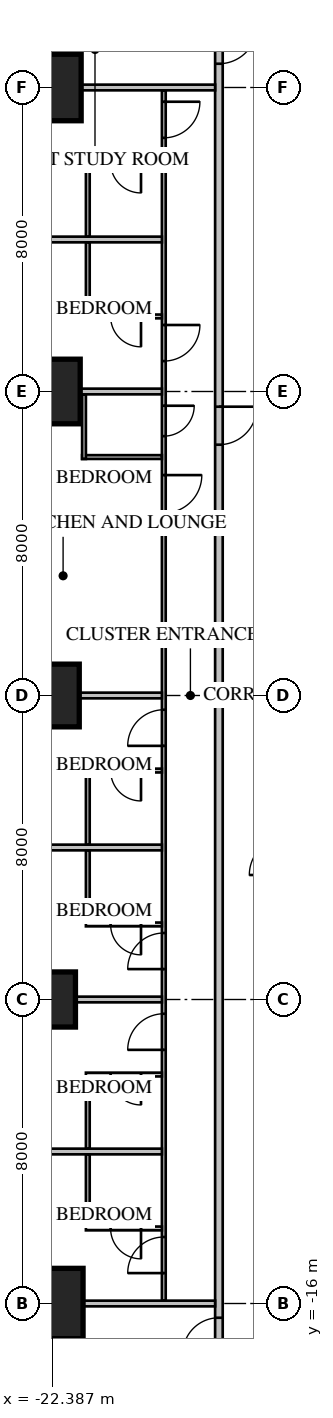
"""IFC4 building model, lengths in metres.
Left out: names, types, materials, properties, quantities, classifications, styles, units other than length and angle.
Written with IfcOpenShell. Run it as: python <this file> out.ifc"""

import sys

from ifc_helpers import new_model, si_unit, direction, frame, frame_2d, origin, origin_2d, place, context, subcontext, project, spatial, rectangle, extrude, element, fill, save


model = new_model("IFC4")
c1 = context("Model", 3, precision=1e-05, world=origin(), true_north=direction((0.0, 1.0)))
c2 = subcontext(c1, "Body", "Model", "MODEL_VIEW")
j1 = project(units=[si_unit("LENGTHUNIT", "METRE"), si_unit("PLANEANGLEUNIT", "RADIAN")], contexts=[c1])
p1 = place(None, origin())
s1 = spatial("IfcSite", under=j1, at=p1, CompositionType="ELEMENT")
p2 = place(p1, origin())
s2 = spatial("IfcBuilding", under=s1, at=p2, CompositionType="ELEMENT")
p3 = place(p2, frame((0.0, 0.0, 39.1)))
s3 = spatial("IfcBuildingStorey", under=s2, at=p3, CompositionType="ELEMENT", Elevation=39.1)
p4 = place(p3, frame((-22.5, 16.0, 0.0), z_axis=(0.0, 0.0, 1.0), x_axis=(1.0, 0.0, 0.0)))
e1 = element("IfcColumn", 1, at=p4, inside=s3, PredefinedType="COLUMN", context=c2, shape_type="SweptSolid", body=[
    extrude(rectangle(XDim=1.75, YDim=1.75, at=origin_2d()), origin(), (0.0, 0.0, 1.0), 3.85),
])
p5 = place(p3, frame((-22.5, 8.0, 0.0), z_axis=(0.0, 0.0, 1.0), x_axis=(1.0, 0.0, 0.0)))
e2 = element("IfcColumn", 2, at=p5, inside=s3, PredefinedType="COLUMN", context=c2, shape_type="SweptSolid", body=[
    extrude(rectangle(XDim=1.7, YDim=1.7, at=origin_2d()), origin(), (0.0, 0.0, 1.0), 3.85),
])
p6 = place(p3, frame((-22.5, 0.0, 0.0), z_axis=(0.0, 0.0, 1.0), x_axis=(1.0, 0.0, 0.0)))
e3 = element("IfcColumn", 3, at=p6, inside=s3, PredefinedType="COLUMN", context=c2, shape_type="SweptSolid", body=[
    extrude(rectangle(XDim=1.65, YDim=1.65, at=origin_2d()), origin(), (0.0, 0.0, 1.0), 3.85),
])
p7 = place(p3, frame((-22.5, -8.0, 0.0), z_axis=(0.0, 0.0, 1.0), x_axis=(1.0, 0.0, 0.0)))
e4 = element("IfcColumn", 4, at=p7, inside=s3, PredefinedType="COLUMN", context=c2, shape_type="SweptSolid", body=[
    extrude(rectangle(XDim=1.45, YDim=1.45, at=origin_2d()), origin(), (0.0, 0.0, 1.0), 3.85),
])
p8 = place(p3, frame((-22.5, -16.0, 0.0), z_axis=(0.0, 0.0, 1.0), x_axis=(1.0, 0.0, 0.0)))
e5 = element("IfcColumn", 5, at=p8, inside=s3, PredefinedType="COLUMN", context=c2, shape_type="SweptSolid", body=[
    extrude(rectangle(XDim=1.85, YDim=1.85, at=origin_2d()), origin(), (0.0, 0.0, 1.0), 3.85),
])
p9 = place(p3, frame((-18.0, 18.0, 0.0), z_axis=(0.0, 0.0, 1.0), x_axis=(0.0, -1.0, 0.0)))
e6 = element("IfcWall", 6, at=p9, inside=s3, PredefinedType="PARTITIONING", context=c2, shape_type="SweptSolid", body=[
    extrude(rectangle(XDim=36.0, YDim=0.2, at=frame_2d((18.0, 0.0))), origin(), (0.0, 0.0, 1.0), 3.65),
])
p10 = place(p9, frame((10.4, 0.0, 0.0)))
e7 = element("IfcOpeningElement", 7, at=p10, cuts=e6, PredefinedType="OPENING", context=c2, shape_type="SweptSolid", body=[
    extrude(rectangle(XDim=1.0, YDim=2.1, at=frame_2d((0.5, 1.05))), frame((0.0, 0.12, 0.0), z_axis=(0.0, -1.0, 0.0), x_axis=(1.0, 0.0, 0.0)), (0.0, 0.0, 1.0), 0.24),
])
p11 = place(p9, frame((0.375, 0.0, 0.0)))
e8 = element("IfcOpeningElement", 8, at=p11, cuts=e6, PredefinedType="OPENING", context=c2, shape_type="SweptSolid", body=[
    extrude(rectangle(XDim=1.0, YDim=2.1, at=frame_2d((0.5, 1.05))), frame((0.0, 0.12, 0.0), z_axis=(0.0, -1.0, 0.0), x_axis=(1.0, 0.0, 0.0)), (0.0, 0.0, 1.0), 0.24),
])
p12 = place(p9, frame((34.375, 0.0, 0.0)))
e9 = element("IfcOpeningElement", 9, at=p12, cuts=e6, PredefinedType="OPENING", context=c2, shape_type="SweptSolid", body=[
    extrude(rectangle(XDim=0.95, YDim=2.1, at=frame_2d((0.475, 1.05))), frame((0.0, 0.12, 0.0), z_axis=(0.0, -1.0, 0.0), x_axis=(1.0, 0.0, 0.0)), (0.0, 0.0, 1.0), 0.24),
])
p13 = place(p3, frame((-19.45, 15.925, 0.0), z_axis=(0.0, 0.0, 1.0), x_axis=(0.0, -1.0, 0.0)))
e10 = element("IfcWall", 10, at=p13, inside=s3, PredefinedType="PARTITIONING", context=c2, shape_type="SweptSolid", body=[
    extrude(rectangle(XDim=31.85, YDim=0.1, at=frame_2d((15.925, 0.0))), origin(), (0.0, 0.0, 1.0), 3.65),
])
p14 = place(p13, frame((10.125, 0.0, 0.0)))
e11 = element("IfcOpeningElement", 11, at=p14, cuts=e10, PredefinedType="OPENING", context=c2, shape_type="SweptSolid", body=[
    extrude(rectangle(XDim=1.0, YDim=2.1, at=frame_2d((0.5, 1.05))), frame((0.0, 0.07, 0.0), z_axis=(0.0, -1.0, 0.0), x_axis=(1.0, 0.0, 0.0)), (0.0, 0.0, 1.0), 0.14),
])
p15 = place(p13, frame((8.3, 0.0, 0.0)))
e12 = element("IfcOpeningElement", 12, at=p15, cuts=e10, PredefinedType="OPENING", context=c2, shape_type="SweptSolid", body=[
    extrude(rectangle(XDim=0.8, YDim=2.1, at=frame_2d((0.4, 1.05))), frame((0.0, 0.07, 0.0), z_axis=(0.0, -1.0, 0.0), x_axis=(1.0, 0.0, 0.0)), (0.0, 0.0, 1.0), 0.14),
])
p16 = place(p13, frame((0.3, 0.0, 0.0)))
e13 = element("IfcOpeningElement", 13, at=p16, cuts=e10, PredefinedType="OPENING", context=c2, shape_type="SweptSolid", body=[
    extrude(rectangle(XDim=0.95, YDim=2.1, at=frame_2d((0.475, 1.05))), frame((0.0, 0.07, 0.0), z_axis=(0.0, -1.0, 0.0), x_axis=(1.0, 0.0, 0.0)), (0.0, 0.0, 1.0), 0.14),
])
p17 = place(p13, frame((6.175, 0.0, 0.0)))
e14 = element("IfcOpeningElement", 14, at=p17, cuts=e10, PredefinedType="OPENING", context=c2, shape_type="SweptSolid", body=[
    extrude(rectangle(XDim=0.95, YDim=2.1, at=frame_2d((0.475, 1.05))), frame((0.0, 0.07, 0.0), z_axis=(0.0, -1.0, 0.0), x_axis=(1.0, 0.0, 0.0)), (0.0, 0.0, 1.0), 0.14),
])
p18 = place(p13, frame((16.3, 0.0, 0.0)))
e15 = element("IfcOpeningElement", 15, at=p18, cuts=e10, PredefinedType="OPENING", context=c2, shape_type="SweptSolid", body=[
    extrude(rectangle(XDim=0.95, YDim=2.1, at=frame_2d((0.475, 1.05))), frame((0.0, 0.07, 0.0), z_axis=(0.0, -1.0, 0.0), x_axis=(1.0, 0.0, 0.0)), (0.0, 0.0, 1.0), 0.14),
])
p19 = place(p13, frame((22.175, 0.0, 0.0)))
e16 = element("IfcOpeningElement", 16, at=p19, cuts=e10, PredefinedType="OPENING", context=c2, shape_type="SweptSolid", body=[
    extrude(rectangle(XDim=0.95, YDim=2.1, at=frame_2d((0.475, 1.05))), frame((0.0, 0.07, 0.0), z_axis=(0.0, -1.0, 0.0), x_axis=(1.0, 0.0, 0.0)), (0.0, 0.0, 1.0), 0.14),
])
p20 = place(p13, frame((24.3, 0.0, 0.0)))
e17 = element("IfcOpeningElement", 17, at=p20, cuts=e10, PredefinedType="OPENING", context=c2, shape_type="SweptSolid", body=[
    extrude(rectangle(XDim=0.95, YDim=2.1, at=frame_2d((0.475, 1.05))), frame((0.0, 0.07, 0.0), z_axis=(0.0, -1.0, 0.0), x_axis=(1.0, 0.0, 0.0)), (0.0, 0.0, 1.0), 0.14),
])
p21 = place(p13, frame((30.175, 0.0, 0.0)))
e18 = element("IfcOpeningElement", 18, at=p21, cuts=e10, PredefinedType="OPENING", context=c2, shape_type="SweptSolid", body=[
    extrude(rectangle(XDim=0.95, YDim=2.1, at=frame_2d((0.475, 1.05))), frame((0.0, 0.07, 0.0), z_axis=(0.0, -1.0, 0.0), x_axis=(1.0, 0.0, 0.0)), (0.0, 0.0, 1.0), 0.14),
])
p22 = place(p3, frame((-19.5, 6.275, 0.0), z_axis=(0.0, 0.0, 1.0), x_axis=(-1.0, 0.0, 0.0)))
e19 = element("IfcWall", 19, at=p22, inside=s3, PredefinedType="PARTITIONING", context=c2, shape_type="SweptSolid", body=[
    extrude(rectangle(XDim=2.1, YDim=0.1, at=frame_2d((1.05, 0.0))), origin(), (0.0, 0.0, 1.0), 3.65),
])
p23 = place(p3, frame((-21.55, 7.925, 0.0), z_axis=(0.0, 0.0, 1.0), x_axis=(0.0, -1.0, 0.0)))
e20 = element("IfcWall", 20, at=p23, inside=s3, PredefinedType="PARTITIONING", context=c2, shape_type="SweptSolid", body=[
    extrude(rectangle(XDim=1.7, YDim=0.1, at=frame_2d((0.85, 0.0))), origin(), (0.0, 0.0, 1.0), 3.65),
])
p24 = place(p3, frame((-18.1, 16.0, 0.0), z_axis=(0.0, 0.0, 1.0), x_axis=(-1.0, 0.0, 0.0)))
e21 = element("IfcWall", 21, at=p24, inside=s3, PredefinedType="PARTITIONING", context=c2, shape_type="SweptSolid", body=[
    extrude(rectangle(XDim=6.589, YDim=0.15, at=frame_2d((3.295, 0.0))), origin(), (0.0, 0.0, 1.0), 3.65),
])
for number, where, z_axis, x_axis in (
    (22, (-19.5, 12.0, 0.0), (0.0, 0.0, 1.0), (-1.0, 0.0, 0.0)),
    (23, (-19.5, 8.0, 0.0), (0.0, 0.0, 1.0), (-1.0, 0.0, 0.0)),
):
    element("IfcWall", number, at=place(p3, frame(where, z_axis=z_axis, x_axis=x_axis)), inside=s3, PredefinedType="PARTITIONING", context=c2, shape_type="SweptSolid", body=[
        extrude(rectangle(XDim=5.2, YDim=0.15, at=frame_2d((2.6, 0.0))), origin(), (0.0, 0.0, 1.0), 3.65),
    ])
p25 = place(p3, frame((-19.5, 0.0, 0.0), z_axis=(0.0, 0.0, 1.0), x_axis=(-1.0, 0.0, 0.0)))
e24 = element("IfcWall", 24, at=p25, inside=s3, PredefinedType="PARTITIONING", context=c2, shape_type="SweptSolid", body=[
    extrude(rectangle(XDim=5.2, YDim=0.15, at=frame_2d((2.6, 0.0))), origin(), (0.0, 0.0, 1.0), 2.957),
])
for number, where, z_axis, x_axis in (
    (25, (-19.5, -4.0, 0.0), (0.0, 0.0, 1.0), (-1.0, 0.0, 0.0)),
    (26, (-19.5, -8.0, 0.0), (0.0, 0.0, 1.0), (-1.0, 0.0, 0.0)),
    (27, (-19.5, -12.0, 0.0), (0.0, 0.0, 1.0), (-1.0, 0.0, 0.0)),
):
    element("IfcWall", number, at=place(p3, frame(where, z_axis=z_axis, x_axis=x_axis)), inside=s3, PredefinedType="PARTITIONING", context=c2, shape_type="SweptSolid", body=[
        extrude(rectangle(XDim=5.2, YDim=0.15, at=frame_2d((2.6, 0.0))), origin(), (0.0, 0.0, 1.0), 3.65),
    ])
p26 = place(p3, frame((-18.1, -16.0, 0.0), z_axis=(0.0, 0.0, 1.0), x_axis=(-1.0, 0.0, 0.0)))
e28 = element("IfcWall", 28, at=p26, inside=s3, PredefinedType="PARTITIONING", context=c2, shape_type="SweptSolid", body=[
    extrude(rectangle(XDim=6.589, YDim=0.15, at=frame_2d((3.295, 0.0))), origin(), (0.0, 0.0, 1.0), 3.65),
])
p27 = place(p3, frame((-19.5, 14.025, 0.0), z_axis=(0.0, 0.0, 1.0), x_axis=(-1.0, 0.0, 0.0)))
e29 = element("IfcWall", 29, at=p27, inside=s3, PredefinedType="PARTITIONING", context=c2, shape_type="SweptSolid", body=[
    extrude(rectangle(XDim=2.0, YDim=0.1, at=frame_2d((1.0, 0.0))), origin(), (0.0, 0.0, 1.0), 3.65),
])
p28 = place(p27, frame((0.55, 0.0, 0.0)))
e30 = element("IfcOpeningElement", 30, at=p28, cuts=e29, PredefinedType="OPENING", context=c2, shape_type="SweptSolid", body=[
    extrude(rectangle(XDim=0.8, YDim=2.1, at=frame_2d((0.4, 1.05))), frame((0.0, 0.07, 0.0), z_axis=(0.0, -1.0, 0.0), x_axis=(1.0, 0.0, 0.0)), (0.0, 0.0, 1.0), 0.14),
])
p29 = place(p3, frame((-21.45, 13.975, 0.0), z_axis=(0.0, 0.0, 1.0), x_axis=(0.0, -1.0, 0.0)))
e31 = element("IfcWall", 31, at=p29, inside=s3, PredefinedType="PARTITIONING", context=c2, shape_type="SweptSolid", body=[
    extrude(rectangle(XDim=1.9, YDim=0.1, at=frame_2d((0.95, 0.0))), origin(), (0.0, 0.0, 1.0), 3.65),
])
p30 = place(p3, frame((-19.5, 9.975, 0.0), z_axis=(0.0, 0.0, 1.0), x_axis=(-1.0, 0.0, 0.0)))
e32 = element("IfcWall", 32, at=p30, inside=s3, PredefinedType="PARTITIONING", context=c2, shape_type="SweptSolid", body=[
    extrude(rectangle(XDim=2.0, YDim=0.1, at=frame_2d((1.0, 0.0))), origin(), (0.0, 0.0, 1.0), 3.65),
])
p31 = place(p30, frame((0.55, 0.0, 0.0)))
e33 = element("IfcOpeningElement", 33, at=p31, cuts=e32, PredefinedType="OPENING", context=c2, shape_type="SweptSolid", body=[
    extrude(rectangle(XDim=0.8, YDim=2.1, at=frame_2d((0.4, 1.05))), frame((0.0, 0.07, 0.0), z_axis=(0.0, -1.0, 0.0), x_axis=(1.0, 0.0, 0.0)), (0.0, 0.0, 1.0), 0.14),
])
p32 = place(p3, frame((-21.45, 11.925, 0.0), z_axis=(0.0, 0.0, 1.0), x_axis=(0.0, -1.0, 0.0)))
e34 = element("IfcWall", 34, at=p32, inside=s3, PredefinedType="PARTITIONING", context=c2, shape_type="SweptSolid", body=[
    extrude(rectangle(XDim=1.9, YDim=0.1, at=frame_2d((0.95, 0.0))), origin(), (0.0, 0.0, 1.0), 3.65),
])
p33 = place(p3, frame((-19.5, -1.975, 0.0), z_axis=(0.0, 0.0, 1.0), x_axis=(-1.0, 0.0, 0.0)))
e35 = element("IfcWall", 35, at=p33, inside=s3, PredefinedType="PARTITIONING", context=c2, shape_type="SweptSolid", body=[
    extrude(rectangle(XDim=2.0, YDim=0.1, at=frame_2d((1.0, 0.0))), origin(), (0.0, 0.0, 1.0), 3.65),
])
p34 = place(p33, frame((0.55, 0.0, 0.0)))
e36 = element("IfcOpeningElement", 36, at=p34, cuts=e35, PredefinedType="OPENING", context=c2, shape_type="SweptSolid", body=[
    extrude(rectangle(XDim=0.8, YDim=2.1, at=frame_2d((0.4, 1.05))), frame((0.0, 0.07, 0.0), z_axis=(0.0, -1.0, 0.0), x_axis=(1.0, 0.0, 0.0)), (0.0, 0.0, 1.0), 0.14),
])
p35 = place(p3, frame((-21.45, -2.025, 0.0), z_axis=(0.0, 0.0, 1.0), x_axis=(0.0, -1.0, 0.0)))
e37 = element("IfcWall", 37, at=p35, inside=s3, PredefinedType="PARTITIONING", context=c2, shape_type="SweptSolid", body=[
    extrude(rectangle(XDim=1.9, YDim=0.1, at=frame_2d((0.95, 0.0))), origin(), (0.0, 0.0, 1.0), 3.65),
])
p36 = place(p3, frame((-19.5, -6.025, 0.0), z_axis=(0.0, 0.0, 1.0), x_axis=(-1.0, 0.0, 0.0)))
e38 = element("IfcWall", 38, at=p36, inside=s3, PredefinedType="PARTITIONING", context=c2, shape_type="SweptSolid", body=[
    extrude(rectangle(XDim=2.0, YDim=0.1, at=frame_2d((1.0, 0.0))), origin(), (0.0, 0.0, 1.0), 3.65),
])
p37 = place(p36, frame((0.55, 0.0, 0.0)))
e39 = element("IfcOpeningElement", 39, at=p37, cuts=e38, PredefinedType="OPENING", context=c2, shape_type="SweptSolid", body=[
    extrude(rectangle(XDim=0.8, YDim=2.1, at=frame_2d((0.4, 1.05))), frame((0.0, 0.07, 0.0), z_axis=(0.0, -1.0, 0.0), x_axis=(1.0, 0.0, 0.0)), (0.0, 0.0, 1.0), 0.14),
])
p38 = place(p3, frame((-21.45, -4.075, 0.0), z_axis=(0.0, 0.0, 1.0), x_axis=(0.0, -1.0, 0.0)))
e40 = element("IfcWall", 40, at=p38, inside=s3, PredefinedType="PARTITIONING", context=c2, shape_type="SweptSolid", body=[
    extrude(rectangle(XDim=1.9, YDim=0.1, at=frame_2d((0.95, 0.0))), origin(), (0.0, 0.0, 1.0), 3.65),
])
p39 = place(p3, frame((-19.5, -9.975, 0.0), z_axis=(0.0, 0.0, 1.0), x_axis=(-1.0, 0.0, 0.0)))
e41 = element("IfcWall", 41, at=p39, inside=s3, PredefinedType="PARTITIONING", context=c2, shape_type="SweptSolid", body=[
    extrude(rectangle(XDim=2.0, YDim=0.1, at=frame_2d((1.0, 0.0))), origin(), (0.0, 0.0, 1.0), 3.65),
])
p40 = place(p39, frame((0.55, 0.0, 0.0)))
e42 = element("IfcOpeningElement", 42, at=p40, cuts=e41, PredefinedType="OPENING", context=c2, shape_type="SweptSolid", body=[
    extrude(rectangle(XDim=0.8, YDim=2.1, at=frame_2d((0.4, 1.05))), frame((0.0, 0.07, 0.0), z_axis=(0.0, -1.0, 0.0), x_axis=(1.0, 0.0, 0.0)), (0.0, 0.0, 1.0), 0.14),
])
p41 = place(p3, frame((-21.45, -10.025, 0.0), z_axis=(0.0, 0.0, 1.0), x_axis=(0.0, -1.0, 0.0)))
e43 = element("IfcWall", 43, at=p41, inside=s3, PredefinedType="PARTITIONING", context=c2, shape_type="SweptSolid", body=[
    extrude(rectangle(XDim=1.9, YDim=0.1, at=frame_2d((0.95, 0.0))), origin(), (0.0, 0.0, 1.0), 3.65),
])
p42 = place(p3, frame((-19.5, -14.025, 0.0), z_axis=(0.0, 0.0, 1.0), x_axis=(-1.0, 0.0, 0.0)))
e44 = element("IfcWall", 44, at=p42, inside=s3, PredefinedType="PARTITIONING", context=c2, shape_type="SweptSolid", body=[
    extrude(rectangle(XDim=2.0, YDim=0.1, at=frame_2d((1.0, 0.0))), origin(), (0.0, 0.0, 1.0), 3.65),
])
p43 = place(p42, frame((0.55, 0.0, 0.0)))
e45 = element("IfcOpeningElement", 45, at=p43, cuts=e44, PredefinedType="OPENING", context=c2, shape_type="SweptSolid", body=[
    extrude(rectangle(XDim=0.8, YDim=2.1, at=frame_2d((0.4, 1.05))), frame((0.0, 0.07, 0.0), z_axis=(0.0, -1.0, 0.0), x_axis=(1.0, 0.0, 0.0)), (0.0, 0.0, 1.0), 0.14),
])
p44 = place(p3, frame((-21.45, -12.075, 0.0), z_axis=(0.0, 0.0, 1.0), x_axis=(0.0, -1.0, 0.0)))
e46 = element("IfcWall", 46, at=p44, inside=s3, PredefinedType="PARTITIONING", context=c2, shape_type="SweptSolid", body=[
    extrude(rectangle(XDim=1.9, YDim=0.1, at=frame_2d((0.95, 0.0))), origin(), (0.0, 0.0, 1.0), 3.65),
])
p45 = place(p10, origin())
e47 = element("IfcDoor", 47, at=p45, inside=s3, OperationType="SINGLE_SWING_LEFT", PredefinedType="DOOR", context=c2, shape_type="SweptSolid", body=[
    extrude(rectangle(XDim=1.0, YDim=2.1, at=frame_2d((0.5, 1.05))), frame((0.0, 0.025, 0.0), z_axis=(0.0, -1.0, 0.0), x_axis=(1.0, 0.0, 0.0)), (0.0, 0.0, 1.0), 0.05),
])
fill(e7, e47)
p46 = place(p14, origin())
e48 = element("IfcDoor", 48, at=p46, inside=s3, OperationType="SINGLE_SWING_LEFT", PredefinedType="DOOR", context=c2, shape_type="SweptSolid", body=[
    extrude(rectangle(XDim=1.0, YDim=2.1, at=frame_2d((0.5, 1.05))), frame((0.0, 0.025, 0.0), z_axis=(0.0, -1.0, 0.0), x_axis=(1.0, 0.0, 0.0)), (0.0, 0.0, 1.0), 0.05),
])
fill(e11, e48)
p47 = place(p15, origin())
e49 = element("IfcDoor", 49, at=p47, inside=s3, OperationType="SINGLE_SWING_LEFT", PredefinedType="DOOR", context=c2, shape_type="SweptSolid", body=[
    extrude(rectangle(XDim=0.8, YDim=2.1, at=frame_2d((0.4, 1.05))), frame((0.0, 0.025, 0.0), z_axis=(0.0, -1.0, 0.0), x_axis=(1.0, 0.0, 0.0)), (0.0, 0.0, 1.0), 0.05),
])
fill(e12, e49)
p48 = place(p11, origin())
e50 = element("IfcDoor", 50, at=p48, inside=s3, OperationType="SINGLE_SWING_LEFT", PredefinedType="DOOR", context=c2, shape_type="SweptSolid", body=[
    extrude(rectangle(XDim=1.0, YDim=2.1, at=frame_2d((0.5, 1.05))), frame((0.0, 0.025, 0.0), z_axis=(0.0, -1.0, 0.0), x_axis=(1.0, 0.0, 0.0)), (0.0, 0.0, 1.0), 0.05),
])
fill(e8, e50)
p49 = place(p16, origin())
e51 = element("IfcDoor", 51, at=p49, inside=s3, OperationType="SINGLE_SWING_LEFT", PredefinedType="DOOR", context=c2, shape_type="SweptSolid", body=[
    extrude(rectangle(XDim=0.95, YDim=2.1, at=frame_2d((0.475, 1.05))), frame((0.0, 0.025, 0.0), z_axis=(0.0, -1.0, 0.0), x_axis=(1.0, 0.0, 0.0)), (0.0, 0.0, 1.0), 0.05),
])
fill(e13, e51)
p50 = place(p28, origin())
e52 = element("IfcDoor", 52, at=p50, inside=s3, OperationType="SINGLE_SWING_LEFT", PredefinedType="DOOR", context=c2, shape_type="SweptSolid", body=[
    extrude(rectangle(XDim=0.8, YDim=2.1, at=frame_2d((0.4, 1.05))), frame((0.0, 0.025, 0.0), z_axis=(0.0, -1.0, 0.0), x_axis=(1.0, 0.0, 0.0)), (0.0, 0.0, 1.0), 0.05),
])
fill(e30, e52)
p51 = place(p17, origin())
e53 = element("IfcDoor", 53, at=p51, inside=s3, OperationType="SINGLE_SWING_LEFT", PredefinedType="DOOR", context=c2, shape_type="SweptSolid", body=[
    extrude(rectangle(XDim=0.95, YDim=2.1, at=frame_2d((0.475, 1.05))), frame((0.0, 0.025, 0.0), z_axis=(0.0, -1.0, 0.0), x_axis=(1.0, 0.0, 0.0)), (0.0, 0.0, 1.0), 0.05),
])
fill(e14, e53)
p52 = place(p31, origin())
e54 = element("IfcDoor", 54, at=p52, inside=s3, OperationType="SINGLE_SWING_LEFT", PredefinedType="DOOR", context=c2, shape_type="SweptSolid", body=[
    extrude(rectangle(XDim=0.8, YDim=2.1, at=frame_2d((0.4, 1.05))), frame((0.0, 0.025, 0.0), z_axis=(0.0, -1.0, 0.0), x_axis=(1.0, 0.0, 0.0)), (0.0, 0.0, 1.0), 0.05),
])
fill(e33, e54)
p53 = place(p18, origin())
e55 = element("IfcDoor", 55, at=p53, inside=s3, OperationType="SINGLE_SWING_RIGHT", PredefinedType="DOOR", context=c2, shape_type="SweptSolid", body=[
    extrude(rectangle(XDim=0.95, YDim=2.1, at=frame_2d((0.475, 1.05))), frame((0.0, 0.025, 0.0), z_axis=(0.0, -1.0, 0.0), x_axis=(1.0, 0.0, 0.0)), (0.0, 0.0, 1.0), 0.05),
])
fill(e15, e55)
p54 = place(p34, origin())
e56 = element("IfcDoor", 56, at=p54, inside=s3, OperationType="SINGLE_SWING_LEFT", PredefinedType="DOOR", context=c2, shape_type="SweptSolid", body=[
    extrude(rectangle(XDim=0.8, YDim=2.1, at=frame_2d((0.4, 1.05))), frame((0.0, 0.025, 0.0), z_axis=(0.0, -1.0, 0.0), x_axis=(1.0, 0.0, 0.0)), (0.0, 0.0, 1.0), 0.05),
])
fill(e36, e56)
p55 = place(p19, origin())
e57 = element("IfcDoor", 57, at=p55, inside=s3, OperationType="SINGLE_SWING_RIGHT", PredefinedType="DOOR", context=c2, shape_type="SweptSolid", body=[
    extrude(rectangle(XDim=0.95, YDim=2.1, at=frame_2d((0.475, 1.05))), frame((0.0, 0.025, 0.0), z_axis=(0.0, -1.0, 0.0), x_axis=(1.0, 0.0, 0.0)), (0.0, 0.0, 1.0), 0.05),
])
fill(e16, e57)
p56 = place(p37, origin())
e58 = element("IfcDoor", 58, at=p56, inside=s3, OperationType="SINGLE_SWING_LEFT", PredefinedType="DOOR", context=c2, shape_type="SweptSolid", body=[
    extrude(rectangle(XDim=0.8, YDim=2.1, at=frame_2d((0.4, 1.05))), frame((0.0, 0.025, 0.0), z_axis=(0.0, -1.0, 0.0), x_axis=(1.0, 0.0, 0.0)), (0.0, 0.0, 1.0), 0.05),
])
fill(e39, e58)
p57 = place(p20, origin())
e59 = element("IfcDoor", 59, at=p57, inside=s3, OperationType="SINGLE_SWING_RIGHT", PredefinedType="DOOR", context=c2, shape_type="SweptSolid", body=[
    extrude(rectangle(XDim=0.95, YDim=2.1, at=frame_2d((0.475, 1.05))), frame((0.0, 0.025, 0.0), z_axis=(0.0, -1.0, 0.0), x_axis=(1.0, 0.0, 0.0)), (0.0, 0.0, 1.0), 0.05),
])
fill(e17, e59)
p58 = place(p40, origin())
e60 = element("IfcDoor", 60, at=p58, inside=s3, OperationType="SINGLE_SWING_LEFT", PredefinedType="DOOR", context=c2, shape_type="SweptSolid", body=[
    extrude(rectangle(XDim=0.8, YDim=2.1, at=frame_2d((0.4, 1.05))), frame((0.0, 0.025, 0.0), z_axis=(0.0, -1.0, 0.0), x_axis=(1.0, 0.0, 0.0)), (0.0, 0.0, 1.0), 0.05),
])
fill(e42, e60)
p59 = place(p21, origin())
e61 = element("IfcDoor", 61, at=p59, inside=s3, OperationType="SINGLE_SWING_RIGHT", PredefinedType="DOOR", context=c2, shape_type="SweptSolid", body=[
    extrude(rectangle(XDim=0.95, YDim=2.1, at=frame_2d((0.475, 1.05))), frame((0.0, 0.025, 0.0), z_axis=(0.0, -1.0, 0.0), x_axis=(1.0, 0.0, 0.0)), (0.0, 0.0, 1.0), 0.05),
])
fill(e18, e61)
p60 = place(p43, origin())
e62 = element("IfcDoor", 62, at=p60, inside=s3, OperationType="SINGLE_SWING_LEFT", PredefinedType="DOOR", context=c2, shape_type="SweptSolid", body=[
    extrude(rectangle(XDim=0.8, YDim=2.1, at=frame_2d((0.4, 1.05))), frame((0.0, 0.025, 0.0), z_axis=(0.0, -1.0, 0.0), x_axis=(1.0, 0.0, 0.0)), (0.0, 0.0, 1.0), 0.05),
])
fill(e45, e62)
p61 = place(p12, origin())
e63 = element("IfcDoor", 63, at=p61, inside=s3, OperationType="SINGLE_SWING_RIGHT", PredefinedType="DOOR", context=c2, shape_type="SweptSolid", body=[
    extrude(rectangle(XDim=0.95, YDim=2.1, at=frame_2d((0.475, 1.05))), frame((0.0, 0.025, 0.0), z_axis=(0.0, -1.0, 0.0), x_axis=(1.0, 0.0, 0.0)), (0.0, 0.0, 1.0), 0.05),
])
fill(e9, e63)
save(model, sys.argv[1])
